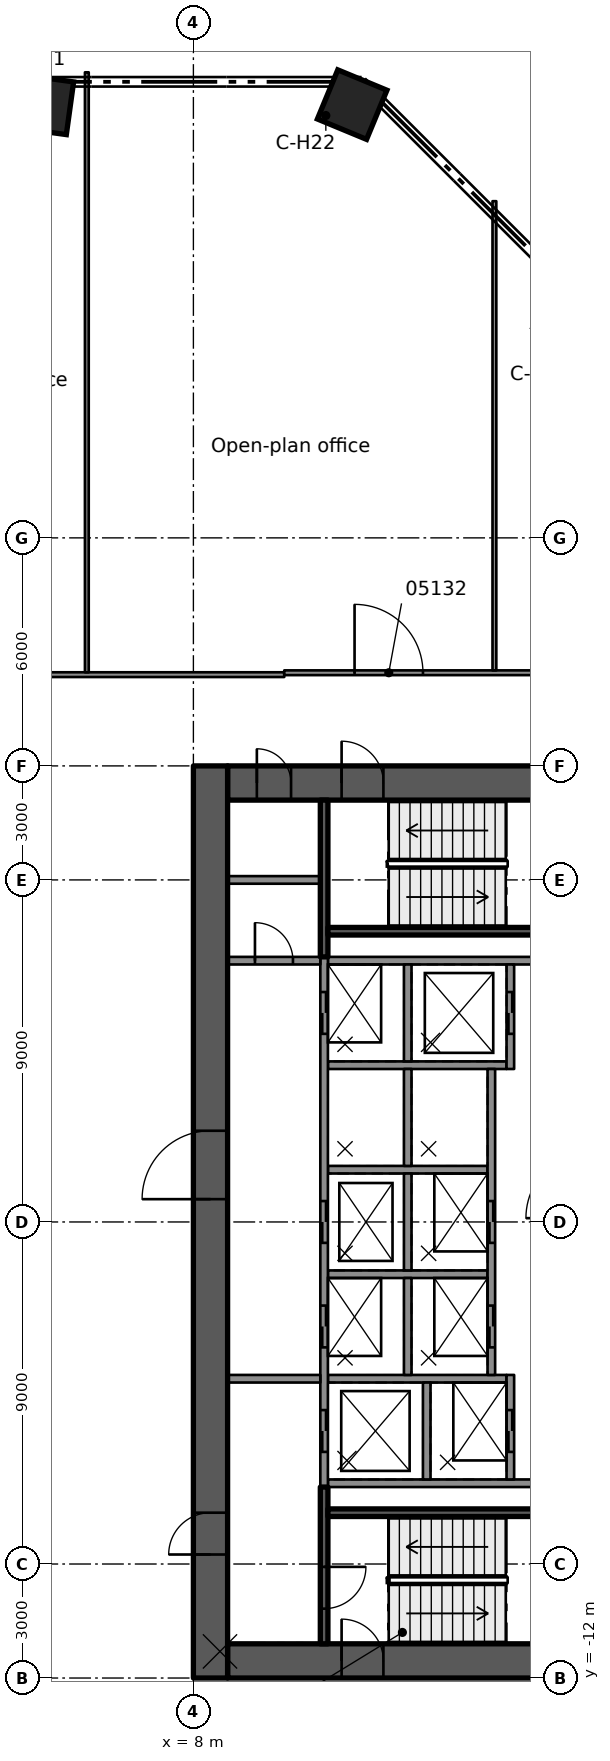
"""IFC4 building model, lengths in metres.
Left out: names, types, materials, properties, quantities, classifications, styles, units other than length and angle.
Written with IfcOpenShell. Run it as: python <this file> out.ifc"""

import sys

from ifc_helpers import new_model, si_unit, direction, frame, frame_2d, origin, origin_2d, place, context, subcontext, project, spatial, rectangle, extrude, element, fill, save


model = new_model("IFC4")
c1 = context("Model", 3, precision=1e-05, world=origin(), true_north=direction((0.0, 1.0)))
c2 = subcontext(c1, "Body", "Model", "MODEL_VIEW")
j1 = project(units=[si_unit("LENGTHUNIT", "METRE"), si_unit("PLANEANGLEUNIT", "RADIAN")], contexts=[c1])
p1 = place(None, origin())
s1 = spatial("IfcSite", under=j1, at=p1, CompositionType="ELEMENT")
p2 = place(p1, origin())
s2 = spatial("IfcBuilding", under=s1, at=p2, CompositionType="ELEMENT")
p3 = place(p2, frame((0.0, 0.0, 25.1)))
s3 = spatial("IfcBuildingStorey", under=s2, at=p3, CompositionType="ELEMENT", Elevation=25.1)
p4 = place(p3, frame((8.9, 11.55, 0.0), z_axis=(0.0, 0.0, 1.0), x_axis=(1.0, 0.0, 0.0)))
e1 = element("IfcWall", 1, at=p4, inside=s3, PredefinedType="SHEAR", context=c2, shape_type="SweptSolid", body=[
    extrude(rectangle(XDim=9.2, YDim=0.9, at=frame_2d((4.6, 0.0))), origin(), (0.0, 0.0, 1.0), 4.1),
])
p5 = place(p4, frame((3.0, 0.0, 0.0)))
e2 = element("IfcOpeningElement", 2, at=p5, cuts=e1, PredefinedType="OPENING", context=c2, shape_type="SweptSolid", body=[
    extrude(rectangle(XDim=1.1, YDim=2.1, at=frame_2d((0.55, 1.05))), frame((0.0, 0.46, 0.0), z_axis=(0.0, -1.0, 0.0), x_axis=(1.0, 0.0, 0.0)), (0.0, 0.0, 1.0), 0.92),
])
p6 = place(p4, frame((0.77, 0.0, 0.0)))
e3 = element("IfcOpeningElement", 3, at=p6, cuts=e1, PredefinedType="OPENING", context=c2, shape_type="SweptSolid", body=[
    extrude(rectangle(XDim=0.9, YDim=2.1, at=frame_2d((0.45, 1.05))), frame((0.0, 0.46, 0.0), z_axis=(0.0, -1.0, 0.0), x_axis=(1.0, 0.0, 0.0)), (0.0, 0.0, 1.0), 0.92),
])
p7 = place(p3, frame((8.9, -11.55, 0.0), z_axis=(0.0, 0.0, 1.0), x_axis=(1.0, 0.0, 0.0)))
e4 = element("IfcWall", 4, at=p7, inside=s3, PredefinedType="SHEAR", context=c2, shape_type="SweptSolid", body=[
    extrude(rectangle(XDim=9.2, YDim=0.9, at=frame_2d((4.6, 0.0))), origin(), (0.0, 0.0, 1.0), 4.1),
])
p8 = place(p7, frame((3.0, 0.0, 0.0)))
e5 = element("IfcOpeningElement", 5, at=p8, cuts=e4, PredefinedType="OPENING", context=c2, shape_type="SweptSolid", body=[
    extrude(rectangle(XDim=1.1, YDim=2.1, at=frame_2d((0.55, 1.05))), frame((0.0, 0.46, 0.0), z_axis=(0.0, -1.0, 0.0), x_axis=(1.0, 0.0, 0.0)), (0.0, 0.0, 1.0), 0.92),
])
p9 = place(p3, frame((8.45, -12.0, 0.0), z_axis=(0.0, 0.0, 1.0), x_axis=(0.0, 1.0, 0.0)))
e6 = element("IfcWall", 6, at=p9, inside=s3, PredefinedType="SHEAR", context=c2, shape_type="SweptSolid", body=[
    extrude(rectangle(XDim=24.0, YDim=0.9, at=frame_2d((12.0, 0.0))), origin(), (0.0, 0.0, 1.0), 4.1),
])
p10 = place(p9, frame((12.6, 0.0, 0.0)))
e7 = element("IfcOpeningElement", 7, at=p10, cuts=e6, PredefinedType="OPENING", context=c2, shape_type="SweptSolid", body=[
    extrude(rectangle(XDim=1.8, YDim=2.1, at=frame_2d((0.9, 1.05))), frame((0.0, 0.46, 0.0), z_axis=(0.0, -1.0, 0.0), x_axis=(1.0, 0.0, 0.0)), (0.0, 0.0, 1.0), 0.92),
])
p11 = place(p9, frame((3.25, 0.0, 0.0)))
e8 = element("IfcOpeningElement", 8, at=p11, cuts=e6, PredefinedType="OPENING", context=c2, shape_type="SweptSolid", body=[
    extrude(rectangle(XDim=1.1, YDim=2.1, at=frame_2d((0.55, 1.05))), frame((0.0, 0.46, 0.0), z_axis=(0.0, -1.0, 0.0), x_axis=(1.0, 0.0, 0.0)), (0.0, 0.0, 1.0), 0.92),
])
for number, where, z_axis, x_axis in (
    (9, (4.059, 29.4, 0.0), (0.0, 0.0, 1.0), (0.137, 0.991, 0.0)),
    (10, (12.178, 29.4, 0.0), (0.0, 0.0, 1.0), (0.383, 0.924, 0.0)),
):
    element("IfcColumn", number, at=place(p3, frame(where, z_axis=z_axis, x_axis=x_axis)), inside=s3, PredefinedType="COLUMN", context=c2, shape_type="SweptSolid", body=[
        extrude(rectangle(XDim=1.4, YDim=1.4, at=origin_2d()), origin(), (0.0, 0.0, 1.0), 4.1),
    ])
for number, where, z_axis, x_axis in (
    (11, (11.54, -6.875, 0.0), (0.0, 0.0, 1.0), (1.0, 0.0, 0.0)),
    (12, (11.54, 6.875, 0.0), (0.0, 0.0, 1.0), (1.0, 0.0, 0.0)),
):
    element("IfcWall", number, at=place(p3, frame(where, z_axis=z_axis, x_axis=x_axis)), inside=s3, PredefinedType="SOLIDWALL", context=c2, shape_type="SweptSolid", body=[
        extrude(rectangle(XDim=6.56, YDim=0.2, at=frame_2d((3.28, 0.0))), origin(), (0.0, 0.0, 1.0), 3.69),
    ])
p12 = place(p3, frame((11.54, 4.125, 0.0), z_axis=(0.0, 0.0, 1.0), x_axis=(1.0, 0.0, 0.0)))
e13 = element("IfcWall", 13, at=p12, inside=s3, PredefinedType="SOLIDWALL", context=c2, shape_type="SweptSolid", body=[
    extrude(rectangle(XDim=4.7, YDim=0.2, at=frame_2d((2.35, 0.0))), origin(), (0.0, 0.0, 1.0), 3.69),
])
for number, where, z_axis, x_axis in (
    (14, (11.54, 1.375, 0.0), (0.0, 0.0, 1.0), (1.0, 0.0, 0.0)),
    (15, (11.54, -1.375, 0.0), (0.0, 0.0, 1.0), (1.0, 0.0, 0.0)),
):
    element("IfcWall", number, at=place(p3, frame(where, z_axis=z_axis, x_axis=x_axis)), inside=s3, PredefinedType="SOLIDWALL", context=c2, shape_type="SweptSolid", body=[
        extrude(rectangle(XDim=4.2, YDim=0.2, at=frame_2d((2.1, 0.0))), origin(), (0.0, 0.0, 1.0), 3.69),
    ])
p13 = place(p3, frame((11.54, -4.125, 0.0), z_axis=(0.0, 0.0, 1.0), x_axis=(1.0, 0.0, 0.0)))
e16 = element("IfcWall", 16, at=p13, inside=s3, PredefinedType="SOLIDWALL", context=c2, shape_type="SweptSolid", body=[
    extrude(rectangle(XDim=4.7, YDim=0.2, at=frame_2d((2.35, 0.0))), origin(), (0.0, 0.0, 1.0), 3.69),
])
p14 = place(p3, frame((11.44, 6.975, 0.0), z_axis=(0.0, 0.0, 1.0), x_axis=(0.0, -1.0, 0.0)))
e17 = element("IfcWall", 17, at=p14, inside=s3, PredefinedType="SOLIDWALL", context=c2, shape_type="SweptSolid", body=[
    extrude(rectangle(XDim=13.95, YDim=0.2, at=frame_2d((6.975, 0.0))), origin(), (0.0, 0.0, 1.0), 3.69),
])
p15 = place(p14, frame((0.925, 0.0, 0.0)))
e18 = element("IfcOpeningElement", 18, at=p15, cuts=e17, PredefinedType="OPENING", context=c2, shape_type="SweptSolid", body=[
    extrude(rectangle(XDim=1.1, YDim=2.1, at=frame_2d((0.55, 1.05))), frame((0.0, 0.11, 0.0), z_axis=(0.0, -1.0, 0.0), x_axis=(1.0, 0.0, 0.0)), (0.0, 0.0, 1.0), 0.22),
])
p16 = place(p14, frame((6.425, 0.0, 0.0)))
e19 = element("IfcOpeningElement", 19, at=p16, cuts=e17, PredefinedType="OPENING", context=c2, shape_type="SweptSolid", body=[
    extrude(rectangle(XDim=1.1, YDim=2.1, at=frame_2d((0.55, 1.05))), frame((0.0, 0.11, 0.0), z_axis=(0.0, -1.0, 0.0), x_axis=(1.0, 0.0, 0.0)), (0.0, 0.0, 1.0), 0.22),
])
p17 = place(p14, frame((9.175, 0.0, 0.0)))
e20 = element("IfcOpeningElement", 20, at=p17, cuts=e17, PredefinedType="OPENING", context=c2, shape_type="SweptSolid", body=[
    extrude(rectangle(XDim=1.1, YDim=2.1, at=frame_2d((0.55, 1.05))), frame((0.0, 0.11, 0.0), z_axis=(0.0, -1.0, 0.0), x_axis=(1.0, 0.0, 0.0)), (0.0, 0.0, 1.0), 0.22),
])
p18 = place(p14, frame((11.925, 0.0, 0.0)))
e21 = element("IfcOpeningElement", 21, at=p18, cuts=e17, PredefinedType="OPENING", context=c2, shape_type="SweptSolid", body=[
    extrude(rectangle(XDim=1.1, YDim=2.1, at=frame_2d((0.55, 1.05))), frame((0.0, 0.11, 0.0), z_axis=(0.0, -1.0, 0.0), x_axis=(1.0, 0.0, 0.0)), (0.0, 0.0, 1.0), 0.22),
])
for number, where, z_axis, x_axis in (
    (22, (13.64, 6.775, 0.0), (0.0, 0.0, 1.0), (0.0, -1.0, 0.0)),
    (23, (13.64, 4.025, 0.0), (0.0, 0.0, 1.0), (0.0, -1.0, 0.0)),
    (24, (13.64, 1.275, 0.0), (0.0, 0.0, 1.0), (0.0, -1.0, 0.0)),
    (25, (13.64, -1.475, 0.0), (0.0, 0.0, 1.0), (0.0, -1.0, 0.0)),
    (26, (14.14, -4.225, 0.0), (0.0, 0.0, 1.0), (0.0, -1.0, 0.0)),
):
    element("IfcWall", number, at=place(p3, frame(where, z_axis=z_axis, x_axis=x_axis)), inside=s3, PredefinedType="SOLIDWALL", context=c2, shape_type="SweptSolid", body=[
        extrude(rectangle(XDim=2.55, YDim=0.2, at=frame_2d((1.275, 0.0))), origin(), (0.0, 0.0, 1.0), 3.69),
    ])
p19 = place(p3, frame((16.34, 6.775, 0.0), z_axis=(0.0, 0.0, 1.0), x_axis=(0.0, -1.0, 0.0)))
e27 = element("IfcWall", 27, at=p19, inside=s3, PredefinedType="SOLIDWALL", context=c2, shape_type="SweptSolid", body=[
    extrude(rectangle(XDim=2.75, YDim=0.2, at=frame_2d((1.375, 0.0))), origin(), (0.0, 0.0, 1.0), 3.69),
])
p20 = place(p19, frame((0.725, 0.0, 0.0)))
e28 = element("IfcOpeningElement", 28, at=p20, cuts=e27, PredefinedType="OPENING", context=c2, shape_type="SweptSolid", body=[
    extrude(rectangle(XDim=1.1, YDim=2.1, at=frame_2d((0.55, 1.05))), frame((0.0, 0.11, 0.0), z_axis=(0.0, -1.0, 0.0), x_axis=(1.0, 0.0, 0.0)), (0.0, 0.0, 1.0), 0.22),
])
p21 = place(p3, frame((15.84, 4.025, 0.0), z_axis=(0.0, 0.0, 1.0), x_axis=(0.0, -1.0, 0.0)))
e29 = element("IfcWall", 29, at=p21, inside=s3, PredefinedType="SOLIDWALL", context=c2, shape_type="SweptSolid", body=[
    extrude(rectangle(XDim=8.05, YDim=0.2, at=frame_2d((4.025, 0.0))), origin(), (0.0, 0.0, 1.0), 3.69),
])
p22 = place(p21, frame((3.475, 0.0, 0.0)))
e30 = element("IfcOpeningElement", 30, at=p22, cuts=e29, PredefinedType="OPENING", context=c2, shape_type="SweptSolid", body=[
    extrude(rectangle(XDim=1.1, YDim=2.1, at=frame_2d((0.55, 1.05))), frame((0.0, 0.11, 0.0), z_axis=(0.0, -1.0, 0.0), x_axis=(1.0, 0.0, 0.0)), (0.0, 0.0, 1.0), 0.22),
])
p23 = place(p21, frame((6.225, 0.0, 0.0)))
e31 = element("IfcOpeningElement", 31, at=p23, cuts=e29, PredefinedType="OPENING", context=c2, shape_type="SweptSolid", body=[
    extrude(rectangle(XDim=1.1, YDim=2.1, at=frame_2d((0.55, 1.05))), frame((0.0, 0.11, 0.0), z_axis=(0.0, -1.0, 0.0), x_axis=(1.0, 0.0, 0.0)), (0.0, 0.0, 1.0), 0.22),
])
p24 = place(p3, frame((16.34, -4.025, 0.0), z_axis=(0.0, 0.0, 1.0), x_axis=(0.0, -1.0, 0.0)))
e32 = element("IfcWall", 32, at=p24, inside=s3, PredefinedType="SOLIDWALL", context=c2, shape_type="SweptSolid", body=[
    extrude(rectangle(XDim=2.75, YDim=0.2, at=frame_2d((1.375, 0.0))), origin(), (0.0, 0.0, 1.0), 3.69),
])
p25 = place(p24, frame((0.925, 0.0, 0.0)))
e33 = element("IfcOpeningElement", 33, at=p25, cuts=e32, PredefinedType="OPENING", context=c2, shape_type="SweptSolid", body=[
    extrude(rectangle(XDim=1.1, YDim=2.1, at=frame_2d((0.55, 1.05))), frame((0.0, 0.11, 0.0), z_axis=(0.0, -1.0, 0.0), x_axis=(1.0, 0.0, 0.0)), (0.0, 0.0, 1.0), 0.22),
])
p26 = place(p3, frame((11.44, -6.975, 0.0), z_axis=(0.0, 0.0, 1.0), x_axis=(0.0, -1.0, 0.0)))
e34 = element("IfcWall", 34, at=p26, inside=s3, PredefinedType="SOLIDWALL", context=c2, shape_type="SweptSolid", body=[
    extrude(rectangle(XDim=4.125, YDim=0.2, at=frame_2d((2.062, 0.0))), origin(), (0.0, 0.0, 1.0), 3.69),
])
p27 = place(p26, frame((2.1, 0.0, 0.0)))
e35 = element("IfcOpeningElement", 35, at=p27, cuts=e34, PredefinedType="OPENING", context=c2, shape_type="SweptSolid", body=[
    extrude(rectangle(XDim=1.1, YDim=2.1, at=frame_2d((0.55, 1.05))), frame((0.0, 0.11, 0.0), z_axis=(0.0, -1.0, 0.0), x_axis=(1.0, 0.0, 0.0)), (0.0, 0.0, 1.0), 0.22),
])
p28 = place(p3, frame((11.54, -7.65, 0.0), z_axis=(0.0, 0.0, 1.0), x_axis=(1.0, 0.0, 0.0)))
e36 = element("IfcWall", 36, at=p28, inside=s3, PredefinedType="SOLIDWALL", context=c2, shape_type="SweptSolid", body=[
    extrude(rectangle(XDim=6.56, YDim=0.2, at=frame_2d((3.28, 0.0))), origin(), (0.0, 0.0, 1.0), 3.69),
])
p29 = place(p3, frame((11.44, 11.1, 0.0), z_axis=(0.0, 0.0, 1.0), x_axis=(0.0, -1.0, 0.0)))
e37 = element("IfcWall", 37, at=p29, inside=s3, PredefinedType="SOLIDWALL", context=c2, shape_type="SweptSolid", body=[
    extrude(rectangle(XDim=4.125, YDim=0.2, at=frame_2d((2.062, 0.0))), origin(), (0.0, 0.0, 1.0), 3.69),
])
p30 = place(p3, frame((11.54, 7.65, 0.0), z_axis=(0.0, 0.0, 1.0), x_axis=(1.0, 0.0, 0.0)))
e38 = element("IfcWall", 38, at=p30, inside=s3, PredefinedType="SOLIDWALL", context=c2, shape_type="SweptSolid", body=[
    extrude(rectangle(XDim=6.56, YDim=0.2, at=frame_2d((3.28, 0.0))), origin(), (0.0, 0.0, 1.0), 3.69),
])
p31 = place(p3, frame((8.9, -4.125, 0.0), z_axis=(0.0, 0.0, 1.0), x_axis=(1.0, 0.0, 0.0)))
e39 = element("IfcWall", 39, at=p31, inside=s3, PredefinedType="PARTITIONING", context=c2, shape_type="SweptSolid", body=[
    extrude(rectangle(XDim=2.44, YDim=0.2, at=frame_2d((1.22, 0.0))), origin(), (0.0, 0.0, 1.0), 3.69),
])
p32 = place(p3, frame((8.9, 6.875, 0.0), z_axis=(0.0, 0.0, 1.0), x_axis=(1.0, 0.0, 0.0)))
e40 = element("IfcWall", 40, at=p32, inside=s3, PredefinedType="PARTITIONING", context=c2, shape_type="SweptSolid", body=[
    extrude(rectangle(XDim=2.44, YDim=0.2, at=frame_2d((1.22, 0.0))), origin(), (0.0, 0.0, 1.0), 3.69),
])
p33 = place(p32, frame((0.72, 0.0, 0.0)))
e41 = element("IfcOpeningElement", 41, at=p33, cuts=e40, PredefinedType="OPENING", context=c2, shape_type="SweptSolid", body=[
    extrude(rectangle(XDim=1.0, YDim=2.1, at=frame_2d((0.5, 1.05))), frame((0.0, 0.11, 0.0), z_axis=(0.0, -1.0, 0.0), x_axis=(1.0, 0.0, 0.0)), (0.0, 0.0, 1.0), 0.22),
])
p34 = place(p3, frame((8.9, 9.0, 0.0), z_axis=(0.0, 0.0, 1.0), x_axis=(1.0, 0.0, 0.0)))
e42 = element("IfcWall", 42, at=p34, inside=s3, PredefinedType="PARTITIONING", context=c2, shape_type="SweptSolid", body=[
    extrude(rectangle(XDim=2.44, YDim=0.2, at=frame_2d((1.22, 0.0))), origin(), (0.0, 0.0, 1.0), 3.69),
])
p35 = place(p3, frame((-10.39, 14.401, 0.0), z_axis=(0.0, 0.0, 1.0), x_axis=(1.0, 0.0, 0.0)))
e43 = element("IfcWall", 43, at=p35, inside=s3, PredefinedType="PARTITIONING", context=c2, shape_type="SweptSolid", body=[
    extrude(rectangle(XDim=20.781, YDim=0.125, at=frame_2d((10.391, 0.0))), origin(), (0.0, 0.0, 1.0), 3.68),
])
p36 = place(p35, frame((12.49, 0.0, 0.0)))
e44 = element("IfcOpeningElement", 44, at=p36, cuts=e43, PredefinedType="OPENING", context=c2, shape_type="SweptSolid", body=[
    extrude(rectangle(XDim=1.1, YDim=2.1, at=frame_2d((0.55, 1.05))), frame((0.0, 0.073, 0.0), z_axis=(0.0, -1.0, 0.0), x_axis=(1.0, 0.0, 0.0)), (0.0, 0.0, 1.0), 0.145),
])
p37 = place(p35, frame((7.295, 0.0, 0.0)))
e45 = element("IfcOpeningElement", 45, at=p37, cuts=e43, PredefinedType="OPENING", context=c2, shape_type="SweptSolid", body=[
    extrude(rectangle(XDim=1.1, YDim=2.1, at=frame_2d((0.55, 1.05))), frame((0.0, 0.073, 0.0), z_axis=(0.0, -1.0, 0.0), x_axis=(1.0, 0.0, 0.0)), (0.0, 0.0, 1.0), 0.145),
])
p38 = place(p3, frame((10.391, 14.451, 0.0), z_axis=(0.0, 0.0, 1.0), x_axis=(1.0, 0.0, 0.0)))
e46 = element("IfcWall", 46, at=p38, inside=s3, PredefinedType="PARTITIONING", context=c2, shape_type="SweptSolid", body=[
    extrude(rectangle(XDim=10.996, YDim=0.125, at=frame_2d((5.498, 0.0))), origin(), (0.0, 0.0, 1.0), 3.68),
])
p39 = place(p38, frame((1.85, 0.0, 0.0)))
e47 = element("IfcOpeningElement", 47, at=p39, cuts=e46, PredefinedType="OPENING", context=c2, shape_type="SweptSolid", body=[
    extrude(rectangle(XDim=1.8, YDim=2.1, at=frame_2d((0.9, 1.05))), frame((0.0, 0.073, 0.0), z_axis=(0.0, -1.0, 0.0), x_axis=(1.0, 0.0, 0.0)), (0.0, 0.0, 1.0), 0.145),
])
p40 = place(p3, frame((15.921, 14.514, 0.0), z_axis=(0.0, 0.0, 1.0), x_axis=(0.0, 1.0, 0.0)))
e48 = element("IfcWall", 48, at=p40, inside=s3, PredefinedType="PARTITIONING", context=c2, shape_type="SweptSolid", body=[
    extrude(rectangle(XDim=12.345, YDim=0.1, at=frame_2d((6.172, 0.0))), origin(), (0.0, 0.0, 1.0), 3.68),
])
p41 = place(p3, frame((5.196, 14.463, 0.0), z_axis=(0.0, 0.0, 1.0), x_axis=(0.0, 1.0, 0.0)))
e49 = element("IfcWall", 49, at=p41, inside=s3, PredefinedType="PARTITIONING", context=c2, shape_type="SweptSolid", body=[
    extrude(rectangle(XDim=15.787, YDim=0.1, at=frame_2d((7.894, 0.0))), origin(), (0.0, 0.0, 1.0), 3.68),
])
p42 = place(p15, origin())
e50 = element("IfcDoor", 50, at=p42, inside=s3, OperationType="DOUBLE_DOOR_SLIDING", PredefinedType="DOOR", context=c2, shape_type="SweptSolid", body=[
    extrude(rectangle(XDim=1.1, YDim=2.1, at=frame_2d((0.55, 1.05))), frame((0.0, 0.025, 0.0), z_axis=(0.0, -1.0, 0.0), x_axis=(1.0, 0.0, 0.0)), (0.0, 0.0, 1.0), 0.05),
])
fill(e18, e50)
p43 = place(p20, origin())
e51 = element("IfcDoor", 51, at=p43, inside=s3, OperationType="DOUBLE_DOOR_SLIDING", PredefinedType="DOOR", context=c2, shape_type="SweptSolid", body=[
    extrude(rectangle(XDim=1.1, YDim=2.1, at=frame_2d((0.55, 1.05))), frame((0.0, 0.025, 0.0), z_axis=(0.0, -1.0, 0.0), x_axis=(1.0, 0.0, 0.0)), (0.0, 0.0, 1.0), 0.05),
])
fill(e28, e51)
p44 = place(p16, origin())
e52 = element("IfcDoor", 52, at=p44, inside=s3, OperationType="DOUBLE_DOOR_SLIDING", PredefinedType="DOOR", context=c2, shape_type="SweptSolid", body=[
    extrude(rectangle(XDim=1.1, YDim=2.1, at=frame_2d((0.55, 1.05))), frame((0.0, 0.025, 0.0), z_axis=(0.0, -1.0, 0.0), x_axis=(1.0, 0.0, 0.0)), (0.0, 0.0, 1.0), 0.05),
])
fill(e19, e52)
p45 = place(p22, origin())
e53 = element("IfcDoor", 53, at=p45, inside=s3, OperationType="DOUBLE_DOOR_SLIDING", PredefinedType="DOOR", context=c2, shape_type="SweptSolid", body=[
    extrude(rectangle(XDim=1.1, YDim=2.1, at=frame_2d((0.55, 1.05))), frame((0.0, 0.025, 0.0), z_axis=(0.0, -1.0, 0.0), x_axis=(1.0, 0.0, 0.0)), (0.0, 0.0, 1.0), 0.05),
])
fill(e30, e53)
p46 = place(p17, origin())
e54 = element("IfcDoor", 54, at=p46, inside=s3, OperationType="DOUBLE_DOOR_SLIDING", PredefinedType="DOOR", context=c2, shape_type="SweptSolid", body=[
    extrude(rectangle(XDim=1.1, YDim=2.1, at=frame_2d((0.55, 1.05))), frame((0.0, 0.025, 0.0), z_axis=(0.0, -1.0, 0.0), x_axis=(1.0, 0.0, 0.0)), (0.0, 0.0, 1.0), 0.05),
])
fill(e20, e54)
p47 = place(p23, origin())
e55 = element("IfcDoor", 55, at=p47, inside=s3, OperationType="DOUBLE_DOOR_SLIDING", PredefinedType="DOOR", context=c2, shape_type="SweptSolid", body=[
    extrude(rectangle(XDim=1.1, YDim=2.1, at=frame_2d((0.55, 1.05))), frame((0.0, 0.025, 0.0), z_axis=(0.0, -1.0, 0.0), x_axis=(1.0, 0.0, 0.0)), (0.0, 0.0, 1.0), 0.05),
])
fill(e31, e55)
p48 = place(p18, origin())
e56 = element("IfcDoor", 56, at=p48, inside=s3, OperationType="DOUBLE_DOOR_SLIDING", PredefinedType="DOOR", context=c2, shape_type="SweptSolid", body=[
    extrude(rectangle(XDim=1.1, YDim=2.1, at=frame_2d((0.55, 1.05))), frame((0.0, 0.025, 0.0), z_axis=(0.0, -1.0, 0.0), x_axis=(1.0, 0.0, 0.0)), (0.0, 0.0, 1.0), 0.05),
])
fill(e21, e56)
p49 = place(p25, origin())
e57 = element("IfcDoor", 57, at=p49, inside=s3, OperationType="DOUBLE_DOOR_SLIDING", PredefinedType="DOOR", context=c2, shape_type="SweptSolid", body=[
    extrude(rectangle(XDim=1.1, YDim=2.1, at=frame_2d((0.55, 1.05))), frame((0.0, 0.025, 0.0), z_axis=(0.0, -1.0, 0.0), x_axis=(1.0, 0.0, 0.0)), (0.0, 0.0, 1.0), 0.05),
])
fill(e33, e57)
p50 = place(p10, origin())
e58 = element("IfcDoor", 58, at=p50, inside=s3, OperationType="SINGLE_SWING_RIGHT", PredefinedType="DOOR", context=c2, shape_type="SweptSolid", body=[
    extrude(rectangle(XDim=1.8, YDim=2.1, at=frame_2d((0.9, 1.05))), frame((0.0, 0.025, 0.0), z_axis=(0.0, -1.0, 0.0), x_axis=(1.0, 0.0, 0.0)), (0.0, 0.0, 1.0), 0.05),
])
fill(e7, e58)
p51 = place(p11, origin())
e59 = element("IfcDoor", 59, at=p51, inside=s3, OperationType="SINGLE_SWING_LEFT", PredefinedType="DOOR", context=c2, shape_type="SweptSolid", body=[
    extrude(rectangle(XDim=1.1, YDim=2.1, at=frame_2d((0.55, 1.05))), frame((0.0, 0.025, 0.0), z_axis=(0.0, -1.0, 0.0), x_axis=(1.0, 0.0, 0.0)), (0.0, 0.0, 1.0), 0.05),
])
fill(e8, e59)
p52 = place(p8, origin())
e60 = element("IfcDoor", 60, at=p52, inside=s3, OperationType="SINGLE_SWING_LEFT", PredefinedType="DOOR", context=c2, shape_type="SweptSolid", body=[
    extrude(rectangle(XDim=1.1, YDim=2.1, at=frame_2d((0.55, 1.05))), frame((0.0, 0.025, 0.0), z_axis=(0.0, -1.0, 0.0), x_axis=(1.0, 0.0, 0.0)), (0.0, 0.0, 1.0), 0.05),
])
fill(e5, e60)
p53 = place(p5, origin())
e61 = element("IfcDoor", 61, at=p53, inside=s3, OperationType="SINGLE_SWING_LEFT", PredefinedType="DOOR", context=c2, shape_type="SweptSolid", body=[
    extrude(rectangle(XDim=1.1, YDim=2.1, at=frame_2d((0.55, 1.05))), frame((0.0, 0.025, 0.0), z_axis=(0.0, -1.0, 0.0), x_axis=(1.0, 0.0, 0.0)), (0.0, 0.0, 1.0), 0.05),
])
fill(e2, e61)
p54 = place(p27, origin())
e62 = element("IfcDoor", 62, at=p54, inside=s3, OperationType="SINGLE_SWING_RIGHT", PredefinedType="DOOR", context=c2, shape_type="SweptSolid", body=[
    extrude(rectangle(XDim=1.1, YDim=2.1, at=frame_2d((0.55, 1.05))), frame((0.0, 0.025, 0.0), z_axis=(0.0, -1.0, 0.0), x_axis=(1.0, 0.0, 0.0)), (0.0, 0.0, 1.0), 0.05),
])
fill(e35, e62)
p55 = place(p6, origin())
e63 = element("IfcDoor", 63, at=p55, inside=s3, OperationType="SINGLE_SWING_LEFT", PredefinedType="DOOR", context=c2, shape_type="SweptSolid", body=[
    extrude(rectangle(XDim=0.9, YDim=2.1, at=frame_2d((0.45, 1.05))), frame((0.0, 0.025, 0.0), z_axis=(0.0, -1.0, 0.0), x_axis=(1.0, 0.0, 0.0)), (0.0, 0.0, 1.0), 0.05),
])
fill(e3, e63)
p56 = place(p33, origin())
e64 = element("IfcDoor", 64, at=p56, inside=s3, OperationType="SINGLE_SWING_RIGHT", PredefinedType="DOOR", context=c2, shape_type="SweptSolid", body=[
    extrude(rectangle(XDim=1.0, YDim=2.1, at=frame_2d((0.5, 1.05))), frame((0.0, 0.025, 0.0), z_axis=(0.0, -1.0, 0.0), x_axis=(1.0, 0.0, 0.0)), (0.0, 0.0, 1.0), 0.05),
])
fill(e41, e64)
p57 = place(p39, origin())
e65 = element("IfcDoor", 65, at=p57, inside=s3, OperationType="DOUBLE_DOOR_SINGLE_SWING", PredefinedType="DOOR", context=c2, shape_type="SweptSolid", body=[
    extrude(rectangle(XDim=1.8, YDim=2.1, at=frame_2d((0.9, 1.05))), frame((0.0, 0.025, 0.0), z_axis=(0.0, -1.0, 0.0), x_axis=(1.0, 0.0, 0.0)), (0.0, 0.0, 1.0), 0.05),
])
fill(e47, e65)
save(model, sys.argv[1])
